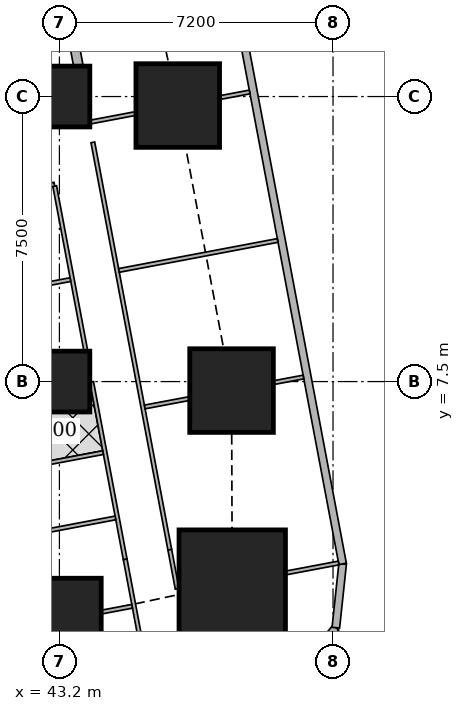
"""IFC4 building model, lengths in metres.
Left out: names, types, materials, properties, quantities, classifications, styles, units other than length and angle.
Written with IfcOpenShell. Run it as: python <this file> out.ifc"""

import sys

from ifc_helpers import new_model, si_unit, direction, frame, frame_2d, origin, origin_2d, place, context, subcontext, project, spatial, rectangle, extrude, element, fill, save


model = new_model("IFC4")
c1 = context("Model", 3, precision=1e-05, world=origin(), true_north=direction((0.0, 1.0)))
c2 = subcontext(c1, "Body", "Model", "MODEL_VIEW")
j1 = project(units=[si_unit("LENGTHUNIT", "METRE"), si_unit("PLANEANGLEUNIT", "RADIAN")], contexts=[c1])
p1 = place(None, origin())
s1 = spatial("IfcSite", under=j1, at=p1, CompositionType="ELEMENT")
p2 = place(p1, origin())
s2 = spatial("IfcBuilding", under=s1, at=p2, CompositionType="ELEMENT")
p3 = place(p2, frame((0.0, 0.0, 111.65)))
s3 = spatial("IfcBuildingStorey", under=s2, at=p3, CompositionType="ELEMENT", Elevation=111.65)
p4 = place(p3, frame((43.2, 1.225, 0.0), z_axis=(0.0, 0.0, 1.0), x_axis=(1.0, 0.0, 0.0)))
e1 = element("IfcColumn", 1, at=p4, inside=s3, PredefinedType="COLUMN", context=c2, shape_type="SweptSolid", body=[
    extrude(rectangle(XDim=2.2, YDim=2.2, at=origin_2d()), origin(), (0.0, 0.0, 1.0), 3.75),
])
p5 = place(p3, frame((47.748, 2.197, 0.0), z_axis=(0.0, 0.0, 1.0), x_axis=(1.0, 0.0, 0.0)))
e2 = element("IfcColumn", 2, at=p5, inside=s3, PredefinedType="COLUMN", context=c2, shape_type="SweptSolid", body=[
    extrude(rectangle(XDim=2.8, YDim=2.8, at=origin_2d()), origin(), (0.0, 0.0, 1.0), 3.75),
])
p6 = place(p3, frame((43.2, 7.5, 0.0), z_axis=(0.0, 0.0, 1.0), x_axis=(1.0, 0.0, 0.0)))
e3 = element("IfcColumn", 3, at=p6, inside=s3, PredefinedType="COLUMN", context=c2, shape_type="SweptSolid", body=[
    extrude(rectangle(XDim=1.6, YDim=1.6, at=origin_2d()), origin(), (0.0, 0.0, 1.0), 3.75),
])
p7 = place(p3, frame((47.73, 7.263, 0.0), z_axis=(0.0, 0.0, 1.0), x_axis=(1.0, 0.0, 0.0)))
e4 = element("IfcColumn", 4, at=p7, inside=s3, PredefinedType="COLUMN", context=c2, shape_type="SweptSolid", body=[
    extrude(rectangle(XDim=2.2, YDim=2.2, at=origin_2d()), origin(), (0.0, 0.0, 1.0), 3.75),
])
p8 = place(p3, frame((43.2, 15.0, 0.0), z_axis=(0.0, 0.0, 1.0), x_axis=(1.0, 0.0, 0.0)))
e5 = element("IfcColumn", 5, at=p8, inside=s3, PredefinedType="COLUMN", context=c2, shape_type="SweptSolid", body=[
    extrude(rectangle(XDim=1.6, YDim=1.6, at=origin_2d()), origin(), (0.0, 0.0, 1.0), 3.75),
])
p9 = place(p3, frame((46.314, 14.763, 0.0), z_axis=(0.0, 0.0, 1.0), x_axis=(1.0, 0.0, 0.0)))
e6 = element("IfcColumn", 6, at=p9, inside=s3, PredefinedType="COLUMN", context=c2, shape_type="SweptSolid", body=[
    extrude(rectangle(XDim=2.2, YDim=2.2, at=origin_2d()), origin(), (0.0, 0.0, 1.0), 3.75),
])
p10 = place(p3, frame((49.407, -0.263, 0.0), z_axis=(0.0, 0.0, 1.0), x_axis=(0.638042593423, 0.770001070764, 0.0)))
e7 = element("IfcWall", 7, at=p10, inside=s3, PredefinedType="SOLIDWALL", context=c2, shape_type="SweptSolid", body=[
    extrude(rectangle(XDim=1.673, YDim=0.2, at=frame_2d((0.836, 0.0))), origin(), (0.0, 0.0, 1.0), 3.5),
])
p11 = place(p3, frame((50.474, 1.025, 0.0), z_axis=(0.0, 0.0, 1.0), x_axis=(0.106047815515, 0.994361031429, 0.0)))
e8 = element("IfcWall", 8, at=p11, inside=s3, PredefinedType="SOLIDWALL", context=c2, shape_type="SweptSolid", body=[
    extrude(rectangle(XDim=1.688, YDim=0.2, at=frame_2d((0.844, 0.0))), origin(), (0.0, 0.0, 1.0), 3.5),
])
p12 = place(p3, frame((50.653, 2.703, 0.0), z_axis=(0.0, 0.0, 1.0), x_axis=(-0.185612026696, 0.982623109613, 0.0)))
e9 = element("IfcWall", 9, at=p12, inside=s3, PredefinedType="SOLIDWALL", context=c2, shape_type="SweptSolid", body=[
    extrude(rectangle(XDim=41.393, YDim=0.2, at=frame_2d((20.697, 0.0))), origin(), (0.0, 0.0, 1.0), 3.5),
])
p13 = place(p12, frame((1.633, 0.0, 0.9)))
e10 = element("IfcOpeningElement", 10, at=p13, cuts=e9, PredefinedType="OPENING", context=c2, shape_type="SweptSolid", body=[
    extrude(rectangle(XDim=1.8, YDim=1.5, at=frame_2d((0.9, 0.75))), frame((0.0, 0.11, 0.0), z_axis=(0.0, -1.0, 0.0), x_axis=(1.0, 0.0, 0.0)), (0.0, 0.0, 1.0), 0.22),
])
p14 = place(p12, frame((6.032, 0.0, 0.9)))
e11 = element("IfcOpeningElement", 11, at=p14, cuts=e9, PredefinedType="OPENING", context=c2, shape_type="SweptSolid", body=[
    extrude(rectangle(XDim=1.8, YDim=1.5, at=frame_2d((0.9, 0.75))), frame((0.0, 0.11, 0.0), z_axis=(0.0, -1.0, 0.0), x_axis=(1.0, 0.0, 0.0)), (0.0, 0.0, 1.0), 0.22),
])
p15 = place(p12, frame((9.848, 0.0, 0.9)))
e12 = element("IfcOpeningElement", 12, at=p15, cuts=e9, PredefinedType="OPENING", context=c2, shape_type="SweptSolid", body=[
    extrude(rectangle(XDim=1.8, YDim=1.5, at=frame_2d((0.9, 0.75))), frame((0.0, 0.11, 0.0), z_axis=(0.0, -1.0, 0.0), x_axis=(1.0, 0.0, 0.0)), (0.0, 0.0, 1.0), 0.22),
])
p16 = place(p12, frame((13.664, 0.0, 0.9)))
e13 = element("IfcOpeningElement", 13, at=p16, cuts=e9, PredefinedType="OPENING", context=c2, shape_type="SweptSolid", body=[
    extrude(rectangle(XDim=1.8, YDim=1.5, at=frame_2d((0.9, 0.75))), frame((0.0, 0.11, 0.0), z_axis=(0.0, -1.0, 0.0), x_axis=(1.0, 0.0, 0.0)), (0.0, 0.0, 1.0), 0.22),
])
p17 = place(p12, frame((17.481, 0.0, 0.9)))
e14 = element("IfcOpeningElement", 14, at=p17, cuts=e9, PredefinedType="OPENING", context=c2, shape_type="SweptSolid", body=[
    extrude(rectangle(XDim=1.8, YDim=1.5, at=frame_2d((0.9, 0.75))), frame((0.0, 0.11, 0.0), z_axis=(0.0, -1.0, 0.0), x_axis=(1.0, 0.0, 0.0)), (0.0, 0.0, 1.0), 0.22),
])
p18 = place(p12, frame((21.297, 0.0, 0.9)))
e15 = element("IfcOpeningElement", 15, at=p18, cuts=e9, PredefinedType="OPENING", context=c2, shape_type="SweptSolid", body=[
    extrude(rectangle(XDim=1.8, YDim=1.5, at=frame_2d((0.9, 0.75))), frame((0.0, 0.11, 0.0), z_axis=(0.0, -1.0, 0.0), x_axis=(1.0, 0.0, 0.0)), (0.0, 0.0, 1.0), 0.22),
])
p19 = place(p12, frame((25.113, 0.0, 0.9)))
e16 = element("IfcOpeningElement", 16, at=p19, cuts=e9, PredefinedType="OPENING", context=c2, shape_type="SweptSolid", body=[
    extrude(rectangle(XDim=1.8, YDim=1.5, at=frame_2d((0.9, 0.75))), frame((0.0, 0.11, 0.0), z_axis=(0.0, -1.0, 0.0), x_axis=(1.0, 0.0, 0.0)), (0.0, 0.0, 1.0), 0.22),
])
p20 = place(p12, frame((28.93, 0.0, 0.9)))
e17 = element("IfcOpeningElement", 17, at=p20, cuts=e9, PredefinedType="OPENING", context=c2, shape_type="SweptSolid", body=[
    extrude(rectangle(XDim=1.8, YDim=1.5, at=frame_2d((0.9, 0.75))), frame((0.0, 0.11, 0.0), z_axis=(0.0, -1.0, 0.0), x_axis=(1.0, 0.0, 0.0)), (0.0, 0.0, 1.0), 0.22),
])
p21 = place(p12, frame((32.746, 0.0, 0.9)))
e18 = element("IfcOpeningElement", 18, at=p21, cuts=e9, PredefinedType="OPENING", context=c2, shape_type="SweptSolid", body=[
    extrude(rectangle(XDim=1.8, YDim=1.5, at=frame_2d((0.9, 0.75))), frame((0.0, 0.11, 0.0), z_axis=(0.0, -1.0, 0.0), x_axis=(1.0, 0.0, 0.0)), (0.0, 0.0, 1.0), 0.22),
])
p22 = place(p12, frame((36.481, 0.0, 0.9)))
e19 = element("IfcOpeningElement", 19, at=p22, cuts=e9, PredefinedType="OPENING", context=c2, shape_type="SweptSolid", body=[
    extrude(rectangle(XDim=1.8, YDim=1.5, at=frame_2d((0.9, 0.75))), frame((0.0, 0.11, 0.0), z_axis=(0.0, -1.0, 0.0), x_axis=(1.0, 0.0, 0.0)), (0.0, 0.0, 1.0), 0.22),
])
p23 = place(p3, frame((44.08, 13.794, 0.0), z_axis=(0.0, 0.0, 1.0), x_axis=(0.185608455357, -0.982623784212, 0.0)))
e20 = element("IfcWall", 20, at=p23, inside=s3, PredefinedType="PARTITIONING", context=c2, shape_type="SweptSolid", body=[
    extrude(rectangle(XDim=10.909, YDim=0.1, at=frame_2d((5.455, 0.0))), origin(), (0.0, 0.0, 1.0), 3.5),
])
p24 = place(p23, frame((1.094, 0.0, 0.0)))
e21 = element("IfcOpeningElement", 21, at=p24, cuts=e20, PredefinedType="OPENING", context=c2, shape_type="SweptSolid", body=[
    extrude(rectangle(XDim=0.9, YDim=2.1, at=frame_2d((0.45, 1.05))), frame((0.0, 0.06, 0.0), z_axis=(0.0, -1.0, 0.0), x_axis=(1.0, 0.0, 0.0)), (0.0, 0.0, 1.0), 0.12),
])
p25 = place(p23, frame((3.639, 0.0, 0.0)))
e22 = element("IfcOpeningElement", 22, at=p25, cuts=e20, PredefinedType="OPENING", context=c2, shape_type="SweptSolid", body=[
    extrude(rectangle(XDim=0.9, YDim=2.1, at=frame_2d((0.45, 1.05))), frame((0.0, 0.06, 0.0), z_axis=(0.0, -1.0, 0.0), x_axis=(1.0, 0.0, 0.0)), (0.0, 0.0, 1.0), 0.12),
])
p26 = place(p23, frame((8.05, 0.0, 0.0)))
e23 = element("IfcOpeningElement", 23, at=p26, cuts=e20, PredefinedType="OPENING", context=c2, shape_type="SweptSolid", body=[
    extrude(rectangle(XDim=0.9, YDim=2.1, at=frame_2d((0.45, 1.05))), frame((0.0, 0.06, 0.0), z_axis=(0.0, -1.0, 0.0), x_axis=(1.0, 0.0, 0.0)), (0.0, 0.0, 1.0), 0.12),
])
p27 = place(p3, frame((46.105, 3.074, 0.0), z_axis=(0.0, 0.0, 1.0), x_axis=(0.185727077805, -0.982601370124, 0.0)))
e24 = element("IfcWall", 24, at=p27, inside=s3, PredefinedType="PARTITIONING", context=c2, shape_type="SweptSolid", body=[
    extrude(rectangle(XDim=1.045, YDim=0.1, at=frame_2d((0.522, 0.0))), origin(), (0.0, 0.0, 1.0), 2.05),
])
p28 = place(p3, frame((43.076, 12.644, 0.0), z_axis=(0.0, 0.0, 1.0), x_axis=(0.185705350074, -0.982605476757, 0.0)))
e25 = element("IfcWall", 25, at=p28, inside=s3, PredefinedType="PARTITIONING", context=c2, shape_type="SweptSolid", body=[
    extrude(rectangle(XDim=4.411, YDim=0.1, at=frame_2d((2.205, 0.0))), origin(), (0.0, 0.0, 1.0), 3.5),
])
p29 = place(p28, frame((0.773, 0.0, 0.0)))
e26 = element("IfcOpeningElement", 26, at=p29, cuts=e25, PredefinedType="OPENING", context=c2, shape_type="SweptSolid", body=[
    extrude(rectangle(XDim=0.9, YDim=2.1, at=frame_2d((0.45, 1.05))), frame((0.0, 0.06, 0.0), z_axis=(0.0, -1.0, 0.0), x_axis=(1.0, 0.0, 0.0)), (0.0, 0.0, 1.0), 0.12),
])
p30 = place(p3, frame((44.049, 7.491, 0.0), z_axis=(0.0, 0.0, 1.0), x_axis=(0.185628828844, -0.982619935632, 0.0)))
e27 = element("IfcWall", 27, at=p30, inside=s3, PredefinedType="PARTITIONING", context=c2, shape_type="SweptSolid", body=[
    extrude(rectangle(XDim=4.75, YDim=0.1, at=frame_2d((2.375, 0.0))), origin(), (0.0, 0.0, 1.0), 3.5),
])
p31 = place(p30, frame((0.8, 0.0, 0.0)))
e28 = element("IfcOpeningElement", 28, at=p31, cuts=e27, PredefinedType="OPENING", context=c2, shape_type="SweptSolid", body=[
    extrude(rectangle(XDim=0.9, YDim=2.1, at=frame_2d((0.45, 1.05))), frame((0.0, 0.06, 0.0), z_axis=(0.0, -1.0, 0.0), x_axis=(1.0, 0.0, 0.0)), (0.0, 0.0, 1.0), 0.12),
])
p32 = place(p30, frame((2.316, 0.0, 0.0)))
e29 = element("IfcOpeningElement", 29, at=p32, cuts=e27, PredefinedType="OPENING", context=c2, shape_type="SweptSolid", body=[
    extrude(rectangle(XDim=0.9, YDim=2.1, at=frame_2d((0.45, 1.05))), frame((0.0, 0.06, 0.0), z_axis=(0.0, -1.0, 0.0), x_axis=(1.0, 0.0, 0.0)), (0.0, 0.0, 1.0), 0.12),
])
p33 = place(p3, frame((44.931, 2.823, 0.0), z_axis=(0.0, 0.0, 1.0), x_axis=(0.185631845838, -0.982619365681, 0.0)))
e30 = element("IfcWall", 30, at=p33, inside=s3, PredefinedType="PARTITIONING", context=c2, shape_type="SweptSolid", body=[
    extrude(rectangle(XDim=2.403, YDim=0.1, at=frame_2d((1.201, 0.0))), origin(), (0.0, 0.0, 1.0), 2.05),
])
p34 = place(p3, frame((48.206, 15.12, 0.0), z_axis=(0.0, 0.0, 1.0), x_axis=(-0.982512656401, -0.186195810938, 0.0)))
e31 = element("IfcWall", 31, at=p34, inside=s3, PredefinedType="PARTITIONING", context=c2, shape_type="SweptSolid", body=[
    extrude(rectangle(XDim=0.796, YDim=0.1, at=frame_2d((0.398, 0.0))), origin(), (0.0, 0.0, 1.0), 3.5),
])
p35 = place(p3, frame((45.204, 14.553, 0.0), z_axis=(0.0, 0.0, 1.0), x_axis=(-0.982545444659, -0.186022711461, 0.0)))
e32 = element("IfcWall", 32, at=p35, inside=s3, PredefinedType="PARTITIONING", context=c2, shape_type="SweptSolid", body=[
    extrude(rectangle(XDim=1.215, YDim=0.1, at=frame_2d((0.608, 0.0))), origin(), (0.0, 0.0, 1.0), 3.5),
])
p36 = place(p3, frame((48.943, 11.213, 0.0), z_axis=(0.0, 0.0, 1.0), x_axis=(-0.982623519589, -0.185609856287, 0.0)))
e33 = element("IfcWall", 33, at=p36, inside=s3, PredefinedType="PARTITIONING", context=c2, shape_type="SweptSolid", body=[
    extrude(rectangle(XDim=4.25, YDim=0.1, at=frame_2d((2.125, 0.0))), origin(), (0.0, 0.0, 1.0), 2.2),
])
p37 = place(p3, frame((49.622, 7.62, 0.0), z_axis=(0.0, 0.0, 1.0), x_axis=(-0.982512656401, -0.186195810938, 0.0)))
e34 = element("IfcWall", 34, at=p37, inside=s3, PredefinedType="PARTITIONING", context=c2, shape_type="SweptSolid", body=[
    extrude(rectangle(XDim=0.796, YDim=0.1, at=frame_2d((0.398, 0.0))), origin(), (0.0, 0.0, 1.0), 2.05),
])
p38 = place(p3, frame((46.62, 7.053, 0.0), z_axis=(0.0, 0.0, 1.0), x_axis=(-0.982749355621, -0.18494243436, 0.0)))
e35 = element("IfcWall", 35, at=p38, inside=s3, PredefinedType="PARTITIONING", context=c2, shape_type="SweptSolid", body=[
    extrude(rectangle(XDim=1.195, YDim=0.1, at=frame_2d((0.597, 0.0))), origin(), (0.0, 0.0, 1.0), 2.05),
])
p39 = place(p3, frame((50.547, 2.726, 0.0), z_axis=(0.0, 0.0, 1.0), x_axis=(-0.982680053146, -0.185310315822, 0.0)))
e36 = element("IfcWall", 36, at=p39, inside=s3, PredefinedType="PARTITIONING", context=c2, shape_type="SweptSolid", body=[
    extrude(rectangle(XDim=1.414, YDim=0.1, at=frame_2d((0.707, 0.0))), origin(), (0.0, 0.0, 1.0), 3.5),
])
p40 = place(p3, frame((43.067, 12.693, 0.0), z_axis=(0.0, 0.0, 1.0), x_axis=(-0.982598214409, -0.185743772548, 0.0)))
e37 = element("IfcWall", 37, at=p40, inside=s3, PredefinedType="PARTITIONING", context=c2, shape_type="SweptSolid", body=[
    extrude(rectangle(XDim=3.575, YDim=0.1, at=frame_2d((1.788, 0.0))), origin(), (0.0, 0.0, 1.0), 3.5),
])
p41 = place(p3, frame((43.49, 10.183, 0.0), z_axis=(0.0, 0.0, 1.0), x_axis=(-0.982588017646, -0.185797706064, 0.0)))
e38 = element("IfcWall", 38, at=p41, inside=s3, PredefinedType="PARTITIONING", context=c2, shape_type="SweptSolid", body=[
    extrude(rectangle(XDim=3.525, YDim=0.1, at=frame_2d((1.763, 0.0))), origin(), (0.0, 0.0, 1.0), 3.5),
])
p42 = place(p41, frame((1.325, 0.0, 0.0)))
e39 = element("IfcOpeningElement", 39, at=p42, cuts=e38, PredefinedType="OPENING", context=c2, shape_type="SweptSolid", body=[
    extrude(rectangle(XDim=0.9, YDim=2.1, at=frame_2d((0.45, 1.05))), frame((0.0, 0.06, 0.0), z_axis=(0.0, -1.0, 0.0), x_axis=(1.0, 0.0, 0.0)), (0.0, 0.0, 1.0), 0.12),
])
p43 = place(p3, frame((45.114, 1.587, 0.0), z_axis=(0.0, 0.0, 1.0), x_axis=(-0.982624706348, -0.185603573443, 0.0)))
e40 = element("IfcWall", 40, at=p43, inside=s3, PredefinedType="PARTITIONING", context=c2, shape_type="SweptSolid", body=[
    extrude(rectangle(XDim=0.818, YDim=0.1, at=frame_2d((0.409, 0.0))), origin(), (0.0, 0.0, 1.0), 2.05),
])
p44 = place(p3, frame((44.35, 5.631, 0.0), z_axis=(0.0, 0.0, 1.0), x_axis=(-0.982638553676, -0.185530247748, 0.0)))
e41 = element("IfcWall", 41, at=p44, inside=s3, PredefinedType="PARTITIONING", context=c2, shape_type="SweptSolid", body=[
    extrude(rectangle(XDim=3.525, YDim=0.1, at=frame_2d((1.763, 0.0))), origin(), (0.0, 0.0, 1.0), 3.5),
])
p45 = place(p3, frame((43.325, 17.792, 0.0), z_axis=(0.0, 0.0, 1.0), x_axis=(0.185296805985, -0.982682600686, 0.0)))
e42 = element("IfcWall", 42, at=p45, inside=s3, PredefinedType="SOLIDWALL", context=c2, shape_type="SweptSolid", body=[
    extrude(rectangle(XDim=2.003, YDim=0.25, at=frame_2d((1.001, 0.0))), origin(), (0.0, 0.0, 1.0), 3.5),
])
p46 = place(p3, frame((41.21, 3.258, 0.0), z_axis=(0.0, 0.0, 1.0), x_axis=(0.982638553676, 0.185530247748, 0.0)))
e43 = element("IfcWall", 43, at=p46, inside=s3, PredefinedType="PARTITIONING", context=c2, shape_type="SweptSolid", body=[
    extrude(rectangle(XDim=3.525, YDim=0.1, at=frame_2d((1.763, 0.0))), origin(), (0.0, 0.0, 1.0), 3.5),
])
p47 = place(p46, frame((1.65, 0.0, 0.0)))
e44 = element("IfcOpeningElement", 44, at=p47, cuts=e43, PredefinedType="OPENING", context=c2, shape_type="SweptSolid", body=[
    extrude(rectangle(XDim=0.9, YDim=2.1, at=frame_2d((0.45, 1.05))), frame((0.0, 0.06, 0.0), z_axis=(0.0, -1.0, 0.0), x_axis=(1.0, 0.0, 0.0)), (0.0, 0.0, 1.0), 0.12),
])
p48 = place(p13, origin())
e45 = element("IfcWindow", 45, at=p48, inside=s3, PartitioningType="SINGLE_PANEL", PredefinedType="WINDOW", context=c2, shape_type="SweptSolid", body=[
    extrude(rectangle(XDim=1.8, YDim=1.5, at=frame_2d((0.9, 0.75))), frame((0.0, 0.03, 0.0), z_axis=(0.0, -1.0, 0.0), x_axis=(1.0, 0.0, 0.0)), (0.0, 0.0, 1.0), 0.06),
])
fill(e10, e45)
p49 = place(p14, origin())
e46 = element("IfcWindow", 46, at=p49, inside=s3, PartitioningType="SINGLE_PANEL", PredefinedType="WINDOW", context=c2, shape_type="SweptSolid", body=[
    extrude(rectangle(XDim=1.8, YDim=1.5, at=frame_2d((0.9, 0.75))), frame((0.0, 0.03, 0.0), z_axis=(0.0, -1.0, 0.0), x_axis=(1.0, 0.0, 0.0)), (0.0, 0.0, 1.0), 0.06),
])
fill(e11, e46)
p50 = place(p15, origin())
e47 = element("IfcWindow", 47, at=p50, inside=s3, PartitioningType="SINGLE_PANEL", PredefinedType="WINDOW", context=c2, shape_type="SweptSolid", body=[
    extrude(rectangle(XDim=1.8, YDim=1.5, at=frame_2d((0.9, 0.75))), frame((0.0, 0.03, 0.0), z_axis=(0.0, -1.0, 0.0), x_axis=(1.0, 0.0, 0.0)), (0.0, 0.0, 1.0), 0.06),
])
fill(e12, e47)
p51 = place(p16, origin())
e48 = element("IfcWindow", 48, at=p51, inside=s3, PartitioningType="SINGLE_PANEL", PredefinedType="WINDOW", context=c2, shape_type="SweptSolid", body=[
    extrude(rectangle(XDim=1.8, YDim=1.5, at=frame_2d((0.9, 0.75))), frame((0.0, 0.03, 0.0), z_axis=(0.0, -1.0, 0.0), x_axis=(1.0, 0.0, 0.0)), (0.0, 0.0, 1.0), 0.06),
])
fill(e13, e48)
p52 = place(p24, origin())
e49 = element("IfcDoor", 49, at=p52, inside=s3, OperationType="SINGLE_SWING_LEFT", PredefinedType="DOOR", context=c2, shape_type="SweptSolid", body=[
    extrude(rectangle(XDim=0.9, YDim=2.1, at=frame_2d((0.45, 1.05))), frame((0.0, 0.025, 0.0), z_axis=(0.0, -1.0, 0.0), x_axis=(1.0, 0.0, 0.0)), (0.0, 0.0, 1.0), 0.05),
])
fill(e21, e49)
p53 = place(p25, origin())
e50 = element("IfcDoor", 50, at=p53, inside=s3, OperationType="SINGLE_SWING_LEFT", PredefinedType="DOOR", context=c2, shape_type="SweptSolid", body=[
    extrude(rectangle(XDim=0.9, YDim=2.1, at=frame_2d((0.45, 1.05))), frame((0.0, 0.025, 0.0), z_axis=(0.0, -1.0, 0.0), x_axis=(1.0, 0.0, 0.0)), (0.0, 0.0, 1.0), 0.05),
])
fill(e22, e50)
p54 = place(p26, origin())
e51 = element("IfcDoor", 51, at=p54, inside=s3, OperationType="SINGLE_SWING_LEFT", PredefinedType="DOOR", context=c2, shape_type="SweptSolid", body=[
    extrude(rectangle(XDim=0.9, YDim=2.1, at=frame_2d((0.45, 1.05))), frame((0.0, 0.025, 0.0), z_axis=(0.0, -1.0, 0.0), x_axis=(1.0, 0.0, 0.0)), (0.0, 0.0, 1.0), 0.05),
])
fill(e23, e51)
p55 = place(p29, origin())
e52 = element("IfcDoor", 52, at=p55, inside=s3, OperationType="SINGLE_SWING_RIGHT", PredefinedType="DOOR", context=c2, shape_type="SweptSolid", body=[
    extrude(rectangle(XDim=0.9, YDim=2.1, at=frame_2d((0.45, 1.05))), frame((0.0, 0.025, 0.0), z_axis=(0.0, -1.0, 0.0), x_axis=(1.0, 0.0, 0.0)), (0.0, 0.0, 1.0), 0.05),
])
fill(e26, e52)
p56 = place(p31, origin())
e53 = element("IfcDoor", 53, at=p56, inside=s3, OperationType="SINGLE_SWING_LEFT", PredefinedType="DOOR", context=c2, shape_type="SweptSolid", body=[
    extrude(rectangle(XDim=0.9, YDim=2.1, at=frame_2d((0.45, 1.05))), frame((0.0, 0.025, 0.0), z_axis=(0.0, -1.0, 0.0), x_axis=(1.0, 0.0, 0.0)), (0.0, 0.0, 1.0), 0.05),
])
fill(e28, e53)
p57 = place(p32, origin())
e54 = element("IfcDoor", 54, at=p57, inside=s3, OperationType="SINGLE_SWING_LEFT", PredefinedType="DOOR", context=c2, shape_type="SweptSolid", body=[
    extrude(rectangle(XDim=0.9, YDim=2.1, at=frame_2d((0.45, 1.05))), frame((0.0, 0.025, 0.0), z_axis=(0.0, -1.0, 0.0), x_axis=(1.0, 0.0, 0.0)), (0.0, 0.0, 1.0), 0.05),
])
fill(e29, e54)
p58 = place(p47, origin())
e55 = element("IfcDoor", 55, at=p58, inside=s3, OperationType="SINGLE_SWING_RIGHT", PredefinedType="DOOR", context=c2, shape_type="SweptSolid", body=[
    extrude(rectangle(XDim=0.9, YDim=2.1, at=frame_2d((0.45, 1.05))), frame((0.0, 0.025, 0.0), z_axis=(0.0, -1.0, 0.0), x_axis=(1.0, 0.0, 0.0)), (0.0, 0.0, 1.0), 0.05),
])
fill(e44, e55)
save(model, sys.argv[1])
